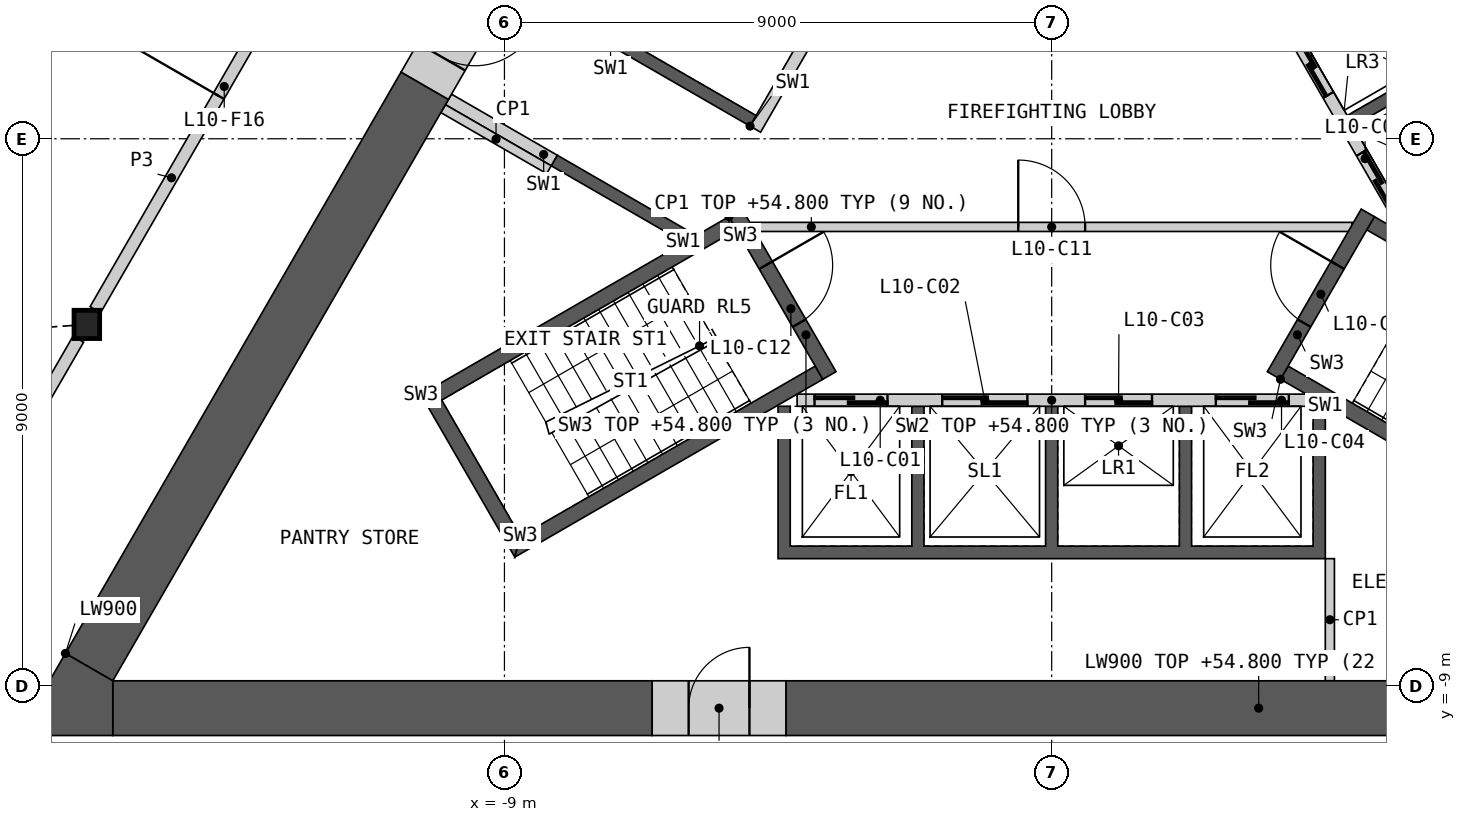
"""IFC4 building model, lengths in metres.
Left out: names, types, materials, properties, quantities, classifications, styles, units other than length and angle.
Written with IfcOpenShell. Run it as: python <this file> out.ifc"""

import sys

from ifc_helpers import new_model, si_unit, direction, frame, frame_2d, origin, origin_2d, place, context, subcontext, project, spatial, polyline, rectangle, i_section, outline, extrude, element, fill, save


model = new_model("IFC4")
c1 = context("Model", 3, precision=1e-05, world=origin(), true_north=direction((0.0, 1.0)))
c2 = subcontext(c1, "Body", "Model", "MODEL_VIEW")
j1 = project(units=[si_unit("LENGTHUNIT", "METRE"), si_unit("PLANEANGLEUNIT", "RADIAN")], contexts=[c1])
p1 = place(None, origin())
s1 = spatial("IfcSite", under=j1, at=p1, CompositionType="ELEMENT")
p2 = place(p1, origin())
s2 = spatial("IfcBuilding", under=s1, at=p2, CompositionType="ELEMENT")
p3 = place(p2, frame((0.0, 0.0, 51.0)))
s3 = spatial("IfcBuildingStorey", under=s2, at=p3, CompositionType="ELEMENT", Elevation=51.0)
p4 = place(p3, frame((-15.868, -3.054, 0.0), z_axis=(0.0, 0.0, 1.0), x_axis=(1.0, 0.0, 0.0)))
e1 = element("IfcColumn", 1, at=p4, inside=s3, PredefinedType="COLUMN", context=c2, shape_type="SweptSolid", body=[
    extrude(i_section(OverallWidth=0.421, OverallDepth=0.465, WebThickness=0.045, FlangeThickness=0.072, at=origin_2d()), origin(), (0.0, 0.0, 1.0), 4.2),
])
p5 = place(p3, origin())
e2 = element("IfcWall", 2, at=p5, inside=s3, PredefinedType="SHEAR", context=c2, shape_type="SweptSolid", body=[
    extrude(outline(polyline([(4.5, -4.4), (4.5, -6.906), (-4.5, -6.906), (-4.5, -4.4), (-4.3, -4.4), (-4.3, -6.7), (-2.3, -6.7), (-2.3, -4.4), (-2.1, -4.4), (-2.1, -6.7), (-0.1, -6.7), (-0.1, -4.4), (0.1, -4.4), (0.1, -6.7), (2.1, -6.7), (2.1, -4.4), (2.3, -4.4), (2.3, -6.7), (4.3, -6.7), (4.3, -4.4), (4.5, -4.4)])), origin(), (0.0, 0.0, 1.0), 3.8),
])
p6 = place(p3, frame((-4.187, -4.3, 0.0), z_axis=(0.0, 0.0, 1.0), x_axis=(1.0, 0.0, 0.0)))
e3 = element("IfcWall", 3, at=p6, inside=s3, PredefinedType="SOLIDWALL", context=c2, shape_type="SweptSolid", body=[
    extrude(rectangle(XDim=8.373, YDim=0.2, at=frame_2d((4.187, 0.0))), origin(), (0.0, 0.0, 1.0), 3.8),
])
p7 = place(p6, frame((0.287, 0.0, 0.0)))
e4 = element("IfcOpeningElement", 4, at=p7, cuts=e3, PredefinedType="OPENING", context=c2, shape_type="SweptSolid", body=[
    extrude(rectangle(XDim=1.2, YDim=2.1, at=frame_2d((0.6, 1.05))), frame((0.0, 0.11, 0.0), z_axis=(0.0, -1.0, 0.0), x_axis=(1.0, 0.0, 0.0)), (0.0, 0.0, 1.0), 0.22),
])
p8 = place(p6, frame((2.387, 0.0, 0.0)))
e5 = element("IfcOpeningElement", 5, at=p8, cuts=e3, PredefinedType="OPENING", context=c2, shape_type="SweptSolid", body=[
    extrude(rectangle(XDim=1.4, YDim=2.1, at=frame_2d((0.7, 1.05))), frame((0.0, 0.11, 0.0), z_axis=(0.0, -1.0, 0.0), x_axis=(1.0, 0.0, 0.0)), (0.0, 0.0, 1.0), 0.22),
])
p9 = place(p6, frame((4.737, 0.0, 0.0)))
e6 = element("IfcOpeningElement", 6, at=p9, cuts=e3, PredefinedType="OPENING", context=c2, shape_type="SweptSolid", body=[
    extrude(rectangle(XDim=1.1, YDim=2.1, at=frame_2d((0.55, 1.05))), frame((0.0, 0.11, 0.0), z_axis=(0.0, -1.0, 0.0), x_axis=(1.0, 0.0, 0.0)), (0.0, 0.0, 1.0), 0.22),
])
p10 = place(p6, frame((6.887, 0.0, 0.0)))
e7 = element("IfcOpeningElement", 7, at=p10, cuts=e3, PredefinedType="OPENING", context=c2, shape_type="SweptSolid", body=[
    extrude(rectangle(XDim=1.2, YDim=2.1, at=frame_2d((0.6, 1.05))), frame((0.0, 0.11, 0.0), z_axis=(0.0, -1.0, 0.0), x_axis=(1.0, 0.0, 0.0)), (0.0, 0.0, 1.0), 0.22),
])
p11 = place(p3, origin())
e8 = element("IfcWall", 8, at=p11, inside=s3, PredefinedType="SHEAR", context=c2, shape_type="SweptSolid", body=[
    extrude(outline(polyline([(2.66, 4.192), (4.831, 5.445), (8.231, -0.444), (6.061, -1.697), (5.96, -1.524), (7.952, -0.374), (6.952, 1.358), (4.96, 0.208), (4.861, 0.381), (6.852, 1.531), (5.852, 3.263), (3.861, 2.113), (3.76, 2.287), (5.752, 3.437), (4.752, 5.169), (2.76, 4.019), (2.66, 4.192)])), origin(), (0.0, 0.0, 1.0), 3.8),
])
p12 = place(p3, frame((5.817, -1.476, 0.0), z_axis=(0.0, 0.0, 1.0), x_axis=(-0.500002616675, 0.866023893041, 0.0)))
e9 = element("IfcWall", 9, at=p12, inside=s3, PredefinedType="SOLIDWALL", context=c2, shape_type="SweptSolid", body=[
    extrude(rectangle(XDim=8.373, YDim=0.2, at=frame_2d((4.187, 0.0))), origin(), (0.0, 0.0, 1.0), 3.8),
])
p13 = place(p12, frame((0.337, 0.0, 0.0)))
e10 = element("IfcOpeningElement", 10, at=p13, cuts=e9, PredefinedType="OPENING", context=c2, shape_type="SweptSolid", body=[
    extrude(rectangle(XDim=1.1, YDim=2.1, at=frame_2d((0.55, 1.05))), frame((0.0, 0.11, 0.0), z_axis=(0.0, -1.0, 0.0), x_axis=(1.0, 0.0, 0.0)), (0.0, 0.0, 1.0), 0.22),
])
p14 = place(p12, frame((2.537, 0.0, 0.0)))
e11 = element("IfcOpeningElement", 11, at=p14, cuts=e9, PredefinedType="OPENING", context=c2, shape_type="SweptSolid", body=[
    extrude(rectangle(XDim=1.1, YDim=2.1, at=frame_2d((0.55, 1.05))), frame((0.0, 0.11, 0.0), z_axis=(0.0, -1.0, 0.0), x_axis=(1.0, 0.0, 0.0)), (0.0, 0.0, 1.0), 0.22),
])
p15 = place(p12, frame((4.737, 0.0, 0.0)))
e12 = element("IfcOpeningElement", 12, at=p15, cuts=e9, PredefinedType="OPENING", context=c2, shape_type="SweptSolid", body=[
    extrude(rectangle(XDim=1.1, YDim=2.1, at=frame_2d((0.55, 1.05))), frame((0.0, 0.11, 0.0), z_axis=(0.0, -1.0, 0.0), x_axis=(1.0, 0.0, 0.0)), (0.0, 0.0, 1.0), 0.22),
])
p16 = place(p12, frame((7.037, 0.0, 0.0)))
e13 = element("IfcOpeningElement", 13, at=p16, cuts=e9, PredefinedType="OPENING", context=c2, shape_type="SweptSolid", body=[
    extrude(rectangle(XDim=0.9, YDim=2.1, at=frame_2d((0.45, 1.05))), frame((0.0, 0.11, 0.0), z_axis=(0.0, -1.0, 0.0), x_axis=(1.0, 0.0, 0.0)), (0.0, 0.0, 1.0), 0.22),
])
p17 = place(p3, origin())
e14 = element("IfcWall", 14, at=p17, inside=s3, PredefinedType="SHEAR", context=c2, shape_type="SweptSolid", body=[
    extrude(outline(polyline([(-6.061, -1.697), (-8.231, -0.444), (-8.131, -0.271), (-5.96, -1.524), (-6.061, -1.697)])), origin(), (0.0, 0.0, 1.0), 3.8),
])
p18 = place(p3, origin())
e15 = element("IfcWall", 15, at=p18, inside=s3, PredefinedType="SHEAR", context=c2, shape_type="SweptSolid", body=[
    extrude(outline(polyline([(-4.96, 0.208), (-7.131, 1.461), (-5.931, 3.54), (-3.76, 2.287), (-3.861, 2.113), (-5.852, 3.263), (-6.852, 1.531), (-4.861, 0.381), (-4.96, 0.208)])), origin(), (0.0, 0.0, 1.0), 3.8),
])
p19 = place(p3, frame((-1.631, 5.776, 0.0), z_axis=(0.0, 0.0, 1.0), x_axis=(-0.499992876559, -0.866029516466, 0.0)))
e16 = element("IfcWall", 16, at=p19, inside=s3, PredefinedType="SOLIDWALL", context=c2, shape_type="SweptSolid", body=[
    extrude(rectangle(XDim=6.486, YDim=0.2, at=frame_2d((3.243, 0.0))), origin(), (0.0, 0.0, 1.0), 3.8),
])
p20 = place(p19, frame((0.437, 0.0, 0.0)))
e17 = element("IfcOpeningElement", 17, at=p20, cuts=e16, PredefinedType="OPENING", context=c2, shape_type="SweptSolid", body=[
    extrude(rectangle(XDim=0.9, YDim=2.1, at=frame_2d((0.45, 1.05))), frame((0.0, 0.11, 0.0), z_axis=(0.0, -1.0, 0.0), x_axis=(1.0, 0.0, 0.0)), (0.0, 0.0, 1.0), 0.22),
])
p21 = place(p19, frame((2.637, 0.0, 0.0)))
e18 = element("IfcOpeningElement", 18, at=p21, cuts=e16, PredefinedType="OPENING", context=c2, shape_type="SweptSolid", body=[
    extrude(rectangle(XDim=0.9, YDim=2.1, at=frame_2d((0.45, 1.05))), frame((0.0, 0.11, 0.0), z_axis=(0.0, -1.0, 0.0), x_axis=(1.0, 0.0, 0.0)), (0.0, 0.0, 1.0), 0.22),
])
p22 = place(p3, frame((-8.181, -0.357, 0.0), z_axis=(0.0, 0.0, 1.0), x_axis=(-0.866035824272, 0.499981950752, 0.0)))
e19 = element("IfcWall", 19, at=p22, inside=s3, PredefinedType="SHEAR", context=c2, shape_type="SweptSolid", body=[
    extrude(rectangle(XDim=2.009, YDim=0.2, at=frame_2d((1.004, 0.0))), origin(), (0.0, 0.0, 1.0), 3.8),
])
p23 = place(p3, frame((-4.941, -1.45, 0.0), z_axis=(0.0, 0.0, 1.0), x_axis=(1.0, 0.0, 0.0)))
e20 = element("IfcWall", 20, at=p23, inside=s3, PredefinedType="PARTITIONING", context=c2, shape_type="SweptSolid", body=[
    extrude(rectangle(XDim=9.882, YDim=0.15, at=frame_2d((4.941, 0.0))), origin(), (0.0, 0.0, 1.0), 3.8),
])
p24 = place(p23, frame((4.391, 0.0, 0.0)))
e21 = element("IfcOpeningElement", 21, at=p24, cuts=e20, PredefinedType="OPENING", context=c2, shape_type="SweptSolid", body=[
    extrude(rectangle(XDim=1.1, YDim=2.1, at=frame_2d((0.55, 1.05))), frame((0.0, 0.085, 0.0), z_axis=(0.0, -1.0, 0.0), x_axis=(1.0, 0.0, 0.0)), (0.0, 0.0, 1.0), 0.17),
])
p25 = place(p3, origin())
e22 = element("IfcWall", 22, at=p25, inside=s3, PredefinedType="SHEAR", context=c2, shape_type="SweptSolid", body=[
    extrude(outline(polyline([(-5.307, -1.281), (-10.374, -4.206), (-10.032, -4.298), (-5.182, -1.498), (-5.307, -1.281)])), origin(), (0.0, 0.0, 1.0), 3.8),
])
p26 = place(p3, origin())
e23 = element("IfcWall", 23, at=p26, inside=s3, PredefinedType="SHEAR", context=c2, shape_type="SweptSolid", body=[
    extrude(outline(polyline([(-10.374, -4.206), (-8.83, -6.881), (-8.738, -6.539), (-10.032, -4.298), (-10.374, -4.206)])), origin(), (0.0, 0.0, 1.0), 3.8),
])
p27 = place(p3, origin())
e24 = element("IfcWall", 24, at=p27, inside=s3, PredefinedType="SHEAR", context=c2, shape_type="SweptSolid", body=[
    extrude(outline(polyline([(-8.738, -6.539), (-8.83, -6.881), (-3.763, -3.956), (-3.888, -3.739), (-8.738, -6.539)])), origin(), (0.0, 0.0, 1.0), 3.8),
])
p28 = place(p3, frame((-5.199, -1.219, 0.0), z_axis=(0.0, 0.0, 1.0), x_axis=(0.499982516597, -0.866035497597, 0.0)))
e25 = element("IfcWall", 25, at=p28, inside=s3, PredefinedType="SHEAR", context=c2, shape_type="SweptSolid", body=[
    extrude(rectangle(XDim=3.088, YDim=0.25, at=frame_2d((1.544, 0.0))), origin(), (0.0, 0.0, 1.0), 3.8),
])
p29 = place(p28, frame((0.994, 0.0, 0.0)))
e26 = element("IfcOpeningElement", 26, at=p29, cuts=e25, PredefinedType="OPENING", context=c2, shape_type="SweptSolid", body=[
    extrude(rectangle(XDim=1.1, YDim=2.1, at=frame_2d((0.55, 1.05))), frame((0.0, 0.135, 0.0), z_axis=(0.0, -1.0, 0.0), x_axis=(1.0, 0.0, 0.0)), (0.0, 0.0, 1.0), 0.27),
])
p30 = place(p3, origin())
e27 = element("IfcWall", 27, at=p30, inside=s3, PredefinedType="SHEAR", context=c2, shape_type="SweptSolid", body=[
    extrude(outline(polyline([(3.763, -3.956), (8.83, -6.881), (8.738, -6.539), (3.888, -3.739), (3.763, -3.956)])), origin(), (0.0, 0.0, 1.0), 3.8),
])
p31 = place(p3, origin())
e28 = element("IfcWall", 28, at=p31, inside=s3, PredefinedType="SHEAR", context=c2, shape_type="SweptSolid", body=[
    extrude(outline(polyline([(10.032, -4.298), (10.374, -4.206), (5.307, -1.281), (5.182, -1.498), (10.032, -4.298)])), origin(), (0.0, 0.0, 1.0), 3.8),
])
p32 = place(p3, frame((3.655, -3.893, 0.0), z_axis=(0.0, 0.0, 1.0), x_axis=(0.499982516597, 0.866035497597, 0.0)))
e29 = element("IfcWall", 29, at=p32, inside=s3, PredefinedType="SHEAR", context=c2, shape_type="SweptSolid", body=[
    extrude(rectangle(XDim=3.088, YDim=0.25, at=frame_2d((1.544, 0.0))), origin(), (0.0, 0.0, 1.0), 3.8),
])
p33 = place(p32, frame((0.994, 0.0, 0.0)))
e30 = element("IfcOpeningElement", 30, at=p33, cuts=e29, PredefinedType="OPENING", context=c2, shape_type="SweptSolid", body=[
    extrude(rectangle(XDim=1.1, YDim=2.1, at=frame_2d((0.55, 1.05))), frame((0.0, 0.135, 0.0), z_axis=(0.0, -1.0, 0.0), x_axis=(1.0, 0.0, 0.0)), (0.0, 0.0, 1.0), 0.27),
])
p34 = place(p3, frame((-8.268, -0.509, 0.0), z_axis=(0.0, 0.0, 1.0), x_axis=(-0.866035824272, 0.499981950752, 0.0)))
e31 = element("IfcWall", 31, at=p34, inside=s3, PredefinedType="PARTITIONING", context=c2, shape_type="SweptSolid", body=[
    extrude(rectangle(XDim=2.009, YDim=0.15, at=frame_2d((1.004, 0.0))), origin(), (0.0, 0.0, 1.0), 3.8),
])
p35 = place(p3, frame((4.575, -6.906, 0.0), z_axis=(0.0, 0.0, 1.0), x_axis=(0.0, -1.0, 0.0)))
e32 = element("IfcWall", 32, at=p35, inside=s3, PredefinedType="PARTITIONING", context=c2, shape_type="SweptSolid", body=[
    extrude(rectangle(XDim=2.009, YDim=0.15, at=frame_2d((1.004, 0.0))), origin(), (0.0, 0.0, 1.0), 3.8),
])
p36 = place(p3, frame((-4.371, -9.365, 0.0), z_axis=(0.0, 0.0, 1.0), x_axis=(1.0, 0.0, 0.0)))
e33 = element("IfcWall", 33, at=p36, inside=s3, PredefinedType="SHEAR", context=c2, shape_type="SweptSolid", body=[
    extrude(rectangle(XDim=15.55, YDim=0.9, at=frame_2d((7.775, 0.0))), origin(), (0.0, 0.0, 1.0), 3.8),
])
p37 = place(p3, frame((-15.441, -9.365, 0.0), z_axis=(0.0, 0.0, 1.0), x_axis=(1.0, 0.0, 0.0)))
e34 = element("IfcWall", 34, at=p37, inside=s3, PredefinedType="SHEAR", context=c2, shape_type="SweptSolid", body=[
    extrude(rectangle(XDim=8.871, YDim=0.9, at=frame_2d((4.435, 0.0))), origin(), (0.0, 0.0, 1.0), 3.8),
])
p38 = place(p3, frame((-10.31, 0.872, 0.0), z_axis=(0.0, 0.0, 1.0), x_axis=(-0.499991697393, -0.866030197244, 0.0)))
e35 = element("IfcWall", 35, at=p38, inside=s3, PredefinedType="SHEAR", context=c2, shape_type="SweptSolid", body=[
    extrude(rectangle(XDim=11.041, YDim=0.9, at=frame_2d((5.521, 0.0))), origin(), (0.0, 0.0, 1.0), 3.8),
])
p39 = place(p3, origin())
e36 = element("IfcWall", 36, at=p39, inside=s3, PredefinedType="SHEAR", context=c2, shape_type="SweptSolid", body=[
    extrude(outline(polyline([(-16.221, -8.465), (-15.441, -8.915), (-15.441, -9.815), (-17.0, -9.815), (-16.221, -8.465)])), origin(), (0.0, 0.0, 1.0), 3.8),
])
p40 = place(p3, frame((-6.571, -9.365, 0.0), z_axis=(0.0, 0.0, 1.0), x_axis=(1.0, 0.0, 0.0)))
e37 = element("IfcWall", 37, at=p40, inside=s3, PredefinedType="SHEAR", context=c2, shape_type="SweptSolid", body=[
    extrude(rectangle(XDim=2.2, YDim=0.9, at=frame_2d((1.1, 0.0))), origin(), (0.0, 0.0, 1.0), 3.8),
])
p41 = place(p40, frame((0.6, 0.0, 0.0)))
e38 = element("IfcOpeningElement", 38, at=p41, cuts=e37, PredefinedType="OPENING", context=c2, shape_type="SweptSolid", body=[
    extrude(rectangle(XDim=1.0, YDim=2.1, at=frame_2d((0.5, 1.05))), frame((0.0, 0.46, 0.0), z_axis=(0.0, -1.0, 0.0), x_axis=(1.0, 0.0, 0.0)), (0.0, 0.0, 1.0), 0.92),
])
p42 = place(p3, frame((-9.21, 2.777, 0.0), z_axis=(0.0, 0.0, 1.0), x_axis=(-0.500077893725, -0.86598042715, 0.0)))
e39 = element("IfcWall", 39, at=p42, inside=s3, PredefinedType="SHEAR", context=c2, shape_type="SweptSolid", body=[
    extrude(rectangle(XDim=2.2, YDim=0.9, at=frame_2d((1.1, 0.0))), origin(), (0.0, 0.0, 1.0), 3.8),
])
p43 = place(p42, frame((0.55, 0.0, 0.0)))
e40 = element("IfcOpeningElement", 40, at=p43, cuts=e39, PredefinedType="OPENING", context=c2, shape_type="SweptSolid", body=[
    extrude(rectangle(XDim=1.1, YDim=2.1, at=frame_2d((0.55, 1.05))), frame((0.0, 0.46, 0.0), z_axis=(0.0, -1.0, 0.0), x_axis=(1.0, 0.0, 0.0)), (0.0, 0.0, 1.0), 0.92),
])
p44 = place(p3, frame((-15.728, -2.811, 0.0), z_axis=(0.0, 0.0, 1.0), x_axis=(0.49999175339, 0.866030164915, 0.0)))
e41 = element("IfcWall", 41, at=p44, inside=s3, PredefinedType="PARTITIONING", context=c2, shape_type="SweptSolid", body=[
    extrude(rectangle(XDim=10.019, YDim=0.2, at=frame_2d((5.009, 0.0))), origin(), (0.0, 0.0, 1.0), 3.8),
])
p45 = place(p44, frame((4.059, 0.0, 0.0)))
e42 = element("IfcOpeningElement", 42, at=p45, cuts=e41, PredefinedType="OPENING", context=c2, shape_type="SweptSolid", body=[
    extrude(rectangle(XDim=1.8, YDim=2.1, at=frame_2d((0.9, 1.05))), frame((0.0, 0.11, 0.0), z_axis=(0.0, -1.0, 0.0), x_axis=(1.0, 0.0, 0.0)), (0.0, 0.0, 1.0), 0.22),
])
p46 = place(p3, frame((-19.244, -8.902, 0.0), z_axis=(0.0, 0.0, 1.0), x_axis=(0.499984737558, 0.86603421538, 0.0)))
e43 = element("IfcWall", 43, at=p46, inside=s3, PredefinedType="PARTITIONING", context=c2, shape_type="SweptSolid", body=[
    extrude(rectangle(XDim=6.473, YDim=0.2, at=frame_2d((3.236, 0.0))), origin(), (0.0, 0.0, 1.0), 3.8),
])
p47 = place(p7, origin())
e44 = element("IfcDoor", 44, at=p47, inside=s3, OperationType="SLIDING_TO_LEFT", PredefinedType="DOOR", context=c2, shape_type="SweptSolid", body=[
    extrude(rectangle(XDim=1.2, YDim=2.1, at=frame_2d((0.6, 1.05))), frame((0.0, 0.025, 0.0), z_axis=(0.0, -1.0, 0.0), x_axis=(1.0, 0.0, 0.0)), (0.0, 0.0, 1.0), 0.05),
])
fill(e4, e44)
p48 = place(p8, origin())
e45 = element("IfcDoor", 45, at=p48, inside=s3, OperationType="SLIDING_TO_LEFT", PredefinedType="DOOR", context=c2, shape_type="SweptSolid", body=[
    extrude(rectangle(XDim=1.4, YDim=2.1, at=frame_2d((0.7, 1.05))), frame((0.0, 0.025, 0.0), z_axis=(0.0, -1.0, 0.0), x_axis=(1.0, 0.0, 0.0)), (0.0, 0.0, 1.0), 0.05),
])
fill(e5, e45)
p49 = place(p9, origin())
e46 = element("IfcDoor", 46, at=p49, inside=s3, OperationType="SLIDING_TO_LEFT", PredefinedType="DOOR", context=c2, shape_type="SweptSolid", body=[
    extrude(rectangle(XDim=1.1, YDim=2.1, at=frame_2d((0.55, 1.05))), frame((0.0, 0.025, 0.0), z_axis=(0.0, -1.0, 0.0), x_axis=(1.0, 0.0, 0.0)), (0.0, 0.0, 1.0), 0.05),
])
fill(e6, e46)
p50 = place(p10, origin())
e47 = element("IfcDoor", 47, at=p50, inside=s3, OperationType="SLIDING_TO_LEFT", PredefinedType="DOOR", context=c2, shape_type="SweptSolid", body=[
    extrude(rectangle(XDim=1.2, YDim=2.1, at=frame_2d((0.6, 1.05))), frame((0.0, 0.025, 0.0), z_axis=(0.0, -1.0, 0.0), x_axis=(1.0, 0.0, 0.0)), (0.0, 0.0, 1.0), 0.05),
])
fill(e7, e47)
p51 = place(p13, origin())
e48 = element("IfcDoor", 48, at=p51, inside=s3, OperationType="SLIDING_TO_LEFT", PredefinedType="DOOR", context=c2, shape_type="SweptSolid", body=[
    extrude(rectangle(XDim=1.1, YDim=2.1, at=frame_2d((0.55, 1.05))), frame((0.0, 0.025, 0.0), z_axis=(0.0, -1.0, 0.0), x_axis=(1.0, 0.0, 0.0)), (0.0, 0.0, 1.0), 0.05),
])
fill(e10, e48)
p52 = place(p14, origin())
e49 = element("IfcDoor", 49, at=p52, inside=s3, OperationType="SLIDING_TO_LEFT", PredefinedType="DOOR", context=c2, shape_type="SweptSolid", body=[
    extrude(rectangle(XDim=1.1, YDim=2.1, at=frame_2d((0.55, 1.05))), frame((0.0, 0.025, 0.0), z_axis=(0.0, -1.0, 0.0), x_axis=(1.0, 0.0, 0.0)), (0.0, 0.0, 1.0), 0.05),
])
fill(e11, e49)
p53 = place(p24, origin())
e50 = element("IfcDoor", 50, at=p53, inside=s3, OperationType="SINGLE_SWING_LEFT", PredefinedType="DOOR", context=c2, shape_type="SweptSolid", body=[
    extrude(rectangle(XDim=1.1, YDim=2.1, at=frame_2d((0.55, 1.05))), frame((0.0, 0.025, 0.0), z_axis=(0.0, -1.0, 0.0), x_axis=(1.0, 0.0, 0.0)), (0.0, 0.0, 1.0), 0.05),
])
fill(e21, e50)
p54 = place(p29, origin())
e51 = element("IfcDoor", 51, at=p54, inside=s3, OperationType="SINGLE_SWING_LEFT", PredefinedType="DOOR", context=c2, shape_type="SweptSolid", body=[
    extrude(rectangle(XDim=1.1, YDim=2.1, at=frame_2d((0.55, 1.05))), frame((0.0, 0.025, 0.0), z_axis=(0.0, -1.0, 0.0), x_axis=(1.0, 0.0, 0.0)), (0.0, 0.0, 1.0), 0.05),
])
fill(e26, e51)
p55 = place(p33, origin())
e52 = element("IfcDoor", 52, at=p55, inside=s3, OperationType="SINGLE_SWING_RIGHT", PredefinedType="DOOR", context=c2, shape_type="SweptSolid", body=[
    extrude(rectangle(XDim=1.1, YDim=2.1, at=frame_2d((0.55, 1.05))), frame((0.0, 0.025, 0.0), z_axis=(0.0, -1.0, 0.0), x_axis=(1.0, 0.0, 0.0)), (0.0, 0.0, 1.0), 0.05),
])
fill(e30, e52)
p56 = place(p41, origin())
e53 = element("IfcDoor", 53, at=p56, inside=s3, OperationType="SINGLE_SWING_RIGHT", PredefinedType="DOOR", context=c2, shape_type="SweptSolid", body=[
    extrude(rectangle(XDim=1.0, YDim=2.1, at=frame_2d((0.5, 1.05))), frame((0.0, 0.205, 0.0), z_axis=(0.0, -1.0, 0.0), x_axis=(1.0, 0.0, 0.0)), (0.0, 0.0, 1.0), 0.05),
])
fill(e38, e53)
p57 = place(p43, origin())
e54 = element("IfcDoor", 54, at=p57, inside=s3, OperationType="SINGLE_SWING_LEFT", PredefinedType="DOOR", context=c2, shape_type="SweptSolid", body=[
    extrude(rectangle(XDim=1.1, YDim=2.1, at=frame_2d((0.55, 1.05))), frame((0.0, 0.205, 0.0), z_axis=(0.0, -1.0, 0.0), x_axis=(1.0, 0.0, 0.0)), (0.0, 0.0, 1.0), 0.05),
])
fill(e40, e54)
p58 = place(p45, origin())
e55 = element("IfcDoor", 55, at=p58, inside=s3, OperationType="DOUBLE_DOOR_SINGLE_SWING", PredefinedType="DOOR", context=c2, shape_type="SweptSolid", body=[
    extrude(rectangle(XDim=1.8, YDim=2.1, at=frame_2d((0.9, 1.05))), frame((0.0, 0.025, 0.0), z_axis=(0.0, -1.0, 0.0), x_axis=(1.0, 0.0, 0.0)), (0.0, 0.0, 1.0), 0.05),
])
fill(e42, e55)
save(model, sys.argv[1])
